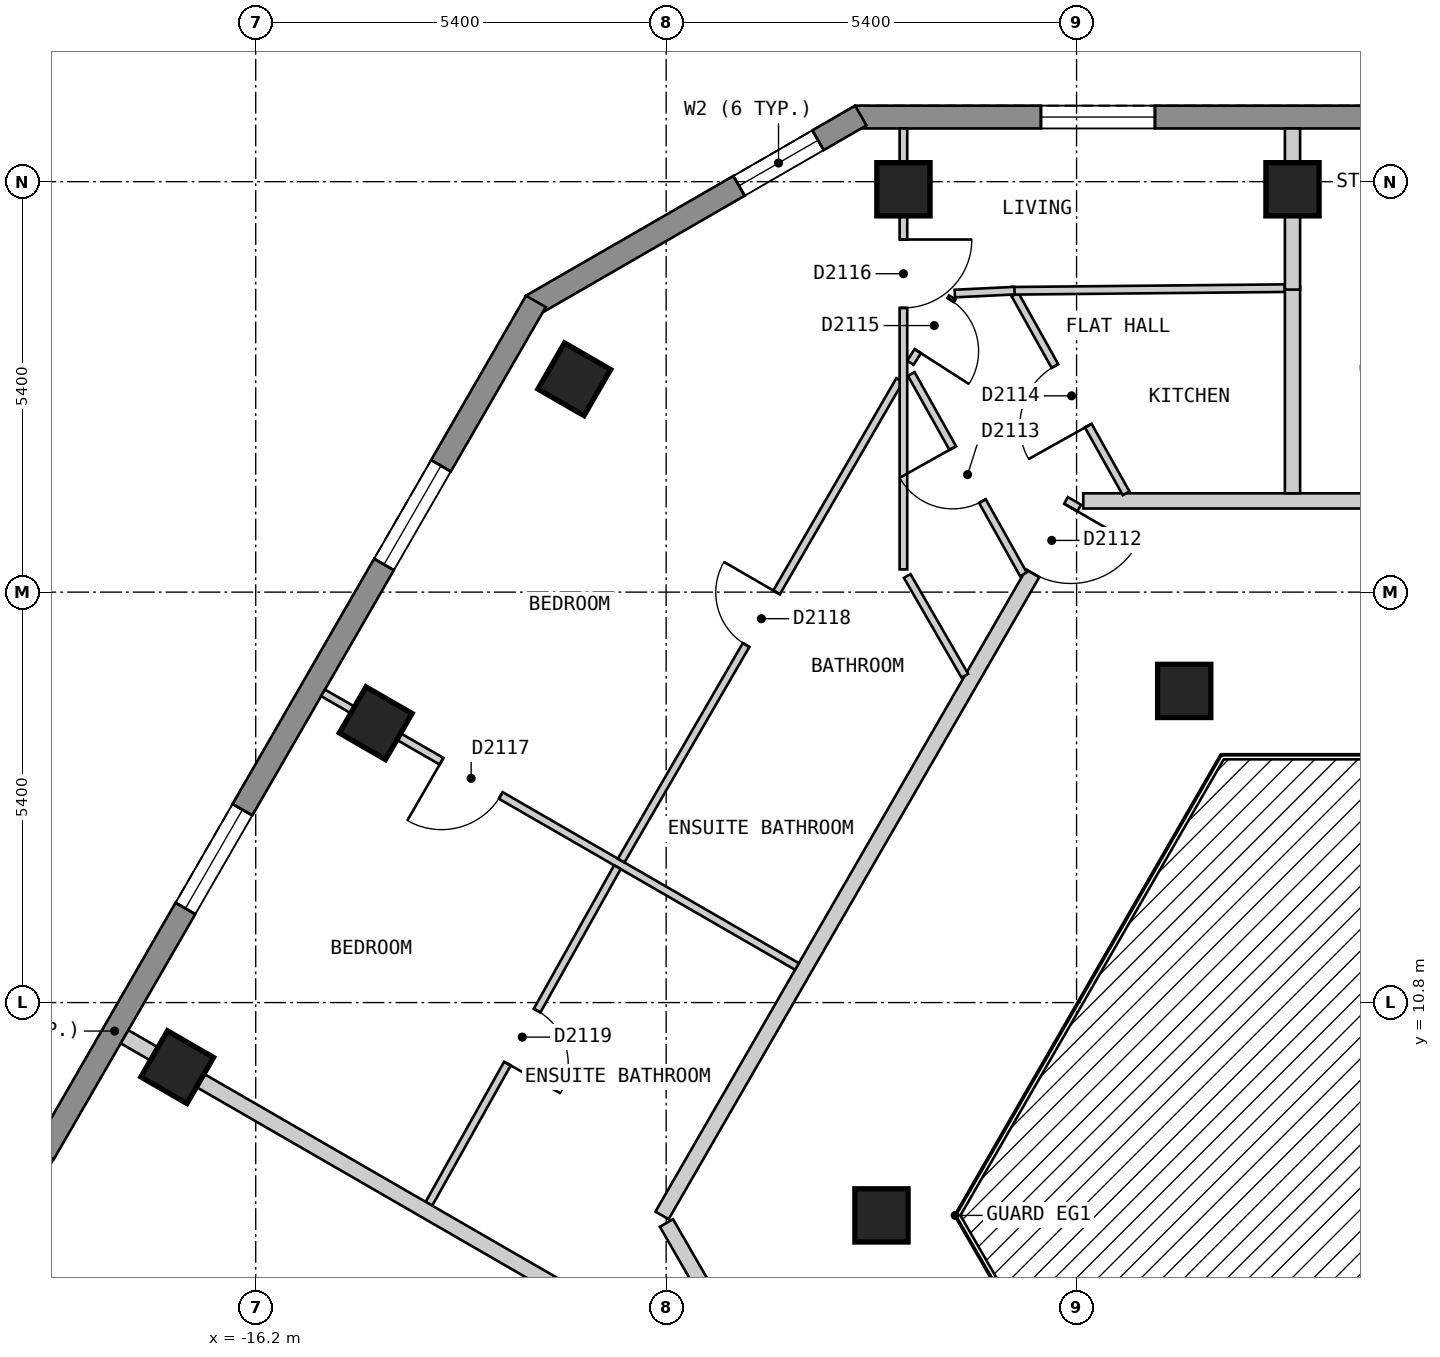
"""IFC4 building model, lengths in metres.
Left out: names, types, materials, properties, quantities, classifications, styles, units other than length and angle.
Written with IfcOpenShell. Run it as: python <this file> out.ifc"""

import sys

from ifc_helpers import new_model, si_unit, direction, frame, frame_2d, origin, origin_2d, place, context, subcontext, project, spatial, polyline, rectangle, outline, extrude, element, fill, save


model = new_model("IFC4")
c1 = context("Model", 3, precision=1e-05, world=origin(), true_north=direction((0.0, 1.0)))
c2 = subcontext(c1, "Body", "Model", "MODEL_VIEW")
j1 = project(units=[si_unit("LENGTHUNIT", "METRE"), si_unit("PLANEANGLEUNIT", "RADIAN")], contexts=[c1])
p1 = place(None, origin())
s1 = spatial("IfcSite", under=j1, at=p1, CompositionType="ELEMENT")
p2 = place(p1, origin())
s2 = spatial("IfcBuilding", under=s1, at=p2, CompositionType="ELEMENT")
p3 = place(p2, frame((0.0, 0.0, 205.8)))
s3 = spatial("IfcBuildingStorey", under=s2, at=p3, CompositionType="ELEMENT", Elevation=205.8)
for number, where, z_axis, x_axis in (
    (1, (-2.559, 21.5, 0.0), (0.0, 0.0, 1.0), (-1.0, 0.0, 0.0)),
    (2, (-7.678, 21.5, 0.0), (0.0, 0.0, 1.0), (-1.0, 0.0, 0.0)),
    (3, (-12.009, 19.0, 0.0), (0.0, 0.0, 1.0), (-0.5, -0.866, 0.0)),
    (4, (-14.621, 14.475, 0.0), (0.0, 0.0, 1.0), (-0.5, -0.866, 0.0)),
    (5, (-17.233, 9.95, 0.0), (0.0, 0.0, 1.0), (-0.5, -0.866, 0.0)),
    (6, (-3.984, 14.9, 0.0), (0.0, 0.0, 1.0), (1.0, 0.0, 0.0)),
    (7, (-7.967, 8.0, 0.0), (0.0, 0.0, 1.0), (1.0, 0.0, 0.0)),
):
    element("IfcColumn", number, at=place(p3, frame(where, z_axis=z_axis, x_axis=x_axis)), inside=s3, PredefinedType="COLUMN", context=c2, shape_type="SweptSolid", body=[
        extrude(rectangle(XDim=0.7, YDim=0.7, at=origin_2d()), origin(), (0.0, 0.0, 1.0), 3.0),
    ])
p4 = place(p3, frame((8.314, 22.45, 0.0), z_axis=(0.0, 0.0, 1.0), x_axis=(-1.0, 0.0, 0.0)))
e8 = element("IfcWall", 8, at=p4, inside=s3, PredefinedType="SOLIDWALL", context=c2, shape_type="SweptSolid", body=[
    extrude(outline(polyline([(0.0, -0.15), (16.628, -0.15), (16.548, 0.15), (0.08, 0.15), (0.0, -0.15)])), origin(), (0.0, 0.0, 1.0), 2.7),
])
p5 = place(p4, frame((2.444, 0.0, 0.15)))
e9 = element("IfcOpeningElement", 9, at=p5, cuts=e8, PredefinedType="OPENING", context=c2, shape_type="SweptSolid", body=[
    extrude(rectangle(XDim=1.5, YDim=2.1, at=frame_2d((0.75, 1.05))), frame((0.0, 0.16, 0.0), z_axis=(0.0, -1.0, 0.0), x_axis=(1.0, 0.0, 0.0)), (0.0, 0.0, 1.0), 0.32),
])
p6 = place(p4, frame((7.564, 0.0, 0.15)))
e10 = element("IfcOpeningElement", 10, at=p6, cuts=e8, PredefinedType="OPENING", context=c2, shape_type="SweptSolid", body=[
    extrude(rectangle(XDim=1.5, YDim=2.1, at=frame_2d((0.75, 1.05))), frame((0.0, 0.16, 0.0), z_axis=(0.0, -1.0, 0.0), x_axis=(1.0, 0.0, 0.0)), (0.0, 0.0, 1.0), 0.32),
])
p7 = place(p4, frame((12.683, 0.0, 0.15)))
e11 = element("IfcOpeningElement", 11, at=p7, cuts=e8, PredefinedType="OPENING", context=c2, shape_type="SweptSolid", body=[
    extrude(rectangle(XDim=1.5, YDim=2.1, at=frame_2d((0.75, 1.05))), frame((0.0, 0.16, 0.0), z_axis=(0.0, -1.0, 0.0), x_axis=(1.0, 0.0, 0.0)), (0.0, 0.0, 1.0), 0.32),
])
p8 = place(p3, frame((-8.239, 22.47, 0.0), z_axis=(0.0, 0.0, 1.0), x_axis=(-0.866022959057, -0.500004234368, 0.0)))
e12 = element("IfcWall", 12, at=p8, inside=s3, PredefinedType="SOLIDWALL", context=c2, shape_type="SweptSolid", body=[
    extrude(outline(polyline([(0.0, -0.15), (5.0, -0.15), (4.92, 0.15), (0.08, 0.15), (0.0, -0.15)])), origin(), (0.0, 0.0, 1.0), 2.7),
])
p9 = place(p8, frame((0.65, 0.0, 0.15)))
e13 = element("IfcOpeningElement", 13, at=p9, cuts=e12, PredefinedType="OPENING", context=c2, shape_type="SweptSolid", body=[
    extrude(rectangle(XDim=1.2, YDim=2.1, at=frame_2d((0.6, 1.05))), frame((0.0, 0.16, 0.0), z_axis=(0.0, -1.0, 0.0), x_axis=(1.0, 0.0, 0.0)), (0.0, 0.0, 1.0), 0.32),
])
p10 = place(p3, frame((-12.514, 20.025, 0.0), z_axis=(0.0, 0.0, 1.0), x_axis=(-0.500003656944, -0.866023292436, 0.0)))
e14 = element("IfcWall", 14, at=p10, inside=s3, PredefinedType="SOLIDWALL", context=c2, shape_type="SweptSolid", body=[
    extrude(outline(polyline([(0.0, -0.15), (22.17, -0.15), (22.09, 0.15), (0.08, 0.15), (0.0, -0.15)])), origin(), (0.0, 0.0, 1.0), 2.7),
])
p11 = place(p10, frame((2.497, 0.0, 0.15)))
e15 = element("IfcOpeningElement", 15, at=p11, cuts=e14, PredefinedType="OPENING", context=c2, shape_type="SweptSolid", body=[
    extrude(rectangle(XDim=1.5, YDim=2.1, at=frame_2d((0.75, 1.05))), frame((0.0, 0.16, 0.0), z_axis=(0.0, -1.0, 0.0), x_axis=(1.0, 0.0, 0.0)), (0.0, 0.0, 1.0), 0.32),
])
p12 = place(p10, frame((7.722, 0.0, 0.15)))
e16 = element("IfcOpeningElement", 16, at=p12, cuts=e14, PredefinedType="OPENING", context=c2, shape_type="SweptSolid", body=[
    extrude(rectangle(XDim=1.5, YDim=2.1, at=frame_2d((0.75, 1.05))), frame((0.0, 0.16, 0.0), z_axis=(0.0, -1.0, 0.0), x_axis=(1.0, 0.0, 0.0)), (0.0, 0.0, 1.0), 0.32),
])
p13 = place(p10, frame((12.948, 0.0, 0.15)))
e17 = element("IfcOpeningElement", 17, at=p13, cuts=e14, PredefinedType="OPENING", context=c2, shape_type="SweptSolid", body=[
    extrude(rectangle(XDim=1.5, YDim=2.1, at=frame_2d((0.75, 1.05))), frame((0.0, 0.16, 0.0), z_axis=(0.0, -1.0, 0.0), x_axis=(1.0, 0.0, 0.0)), (0.0, 0.0, 1.0), 0.32),
])
p14 = place(p10, frame((18.173, 0.0, 0.15)))
e18 = element("IfcOpeningElement", 18, at=p14, cuts=e14, PredefinedType="OPENING", context=c2, shape_type="SweptSolid", body=[
    extrude(rectangle(XDim=1.5, YDim=2.1, at=frame_2d((0.75, 1.05))), frame((0.0, 0.16, 0.0), z_axis=(0.0, -1.0, 0.0), x_axis=(1.0, 0.0, 0.0)), (0.0, 0.0, 1.0), 0.32),
])
p15 = place(p3, frame((-10.796, 7.9, 0.0), z_axis=(0.0, 0.0, 1.0), x_axis=(0.499698840221, -0.866199208659, 0.0)))
e19 = element("IfcWall", 19, at=p15, inside=s3, PredefinedType="PARTITIONING", context=c2, shape_type="SweptSolid", body=[
    extrude(rectangle(XDim=2.685, YDim=0.2, at=frame_2d((1.343, 0.0))), origin(), (0.0, 0.0, 1.0), 2.7),
])
p16 = place(p3, frame((-5.312, 17.4, 0.0), z_axis=(0.0, 0.0, 1.0), x_axis=(1.0, 0.0, 0.0)))
e20 = element("IfcWall", 20, at=p16, inside=s3, PredefinedType="PARTITIONING", context=c2, shape_type="SweptSolid", body=[
    extrude(rectangle(XDim=10.739, YDim=0.2, at=frame_2d((5.37, 0.0))), origin(), (0.0, 0.0, 1.0), 2.7),
])
p17 = place(p16, frame((9.534, 0.0, 0.0)))
e21 = element("IfcOpeningElement", 21, at=p17, cuts=e20, PredefinedType="OPENING", context=c2, shape_type="SweptSolid", body=[
    extrude(rectangle(XDim=1.0, YDim=2.1, at=frame_2d((0.5, 1.05))), frame((0.0, 0.11, 0.0), z_axis=(0.0, -1.0, 0.0), x_axis=(1.0, 0.0, 0.0)), (0.0, 0.0, 1.0), 0.22),
])
p18 = place(p16, frame((4.812, 0.0, 0.0)))
e22 = element("IfcOpeningElement", 22, at=p18, cuts=e20, PredefinedType="OPENING", context=c2, shape_type="SweptSolid", body=[
    extrude(rectangle(XDim=1.0, YDim=2.1, at=frame_2d((0.5, 1.05))), frame((0.0, 0.11, 0.0), z_axis=(0.0, -1.0, 0.0), x_axis=(1.0, 0.0, 0.0)), (0.0, 0.0, 1.0), 0.22),
])
p19 = place(p3, frame((-10.854, 8.0, 0.0), z_axis=(0.0, 0.0, 1.0), x_axis=(0.499997637144, 0.866026767976, 0.0)))
e23 = element("IfcWall", 23, at=p19, inside=s3, PredefinedType="PARTITIONING", context=c2, shape_type="SweptSolid", body=[
    extrude(rectangle(XDim=10.854, YDim=0.2, at=frame_2d((5.427, 0.0))), origin(), (0.0, 0.0, 1.0), 2.7),
])
p20 = place(p19, frame((9.754, 0.0, 0.0)))
e24 = element("IfcOpeningElement", 24, at=p20, cuts=e23, PredefinedType="OPENING", context=c2, shape_type="SweptSolid", body=[
    extrude(rectangle(XDim=1.0, YDim=2.1, at=frame_2d((0.5, 1.05))), frame((0.0, 0.11, 0.0), z_axis=(0.0, -1.0, 0.0), x_axis=(1.0, 0.0, 0.0)), (0.0, 0.0, 1.0), 0.22),
])
p21 = place(p3, frame((-7.628, 16.412, 0.0), z_axis=(0.0, 0.0, 1.0), x_axis=(0.500159472144, -0.86593331292, 0.0)))
e25 = element("IfcWall", 25, at=p21, inside=s3, PredefinedType="PARTITIONING", context=c2, shape_type="SweptSolid", body=[
    extrude(rectangle(XDim=1.515, YDim=0.1, at=frame_2d((0.758, 0.0))), origin(), (0.0, 0.0, 1.0), 2.7),
])
p22 = place(p3, frame((-6.211, 20.115, 0.0), z_axis=(0.0, 0.0, 1.0), x_axis=(0.488221234931, -0.872719901092, 0.0)))
e26 = element("IfcWall", 26, at=p22, inside=s3, PredefinedType="PARTITIONING", context=c2, shape_type="SweptSolid", body=[
    extrude(rectangle(XDim=2.996, YDim=0.1, at=frame_2d((1.498, 0.0))), origin(), (0.0, 0.0, 1.0), 2.7),
])
p23 = place(p22, frame((1.077, 0.0, 0.0)))
e27 = element("IfcOpeningElement", 27, at=p23, cuts=e26, PredefinedType="OPENING", context=c2, shape_type="SweptSolid", body=[
    extrude(rectangle(XDim=0.9, YDim=2.1, at=frame_2d((0.45, 1.05))), frame((0.0, 0.06, 0.0), z_axis=(0.0, -1.0, 0.0), x_axis=(1.0, 0.0, 0.0)), (0.0, 0.0, 1.0), 0.12),
])
p24 = place(p3, frame((-7.575, 19.07, 0.0), z_axis=(0.0, 0.0, 1.0), x_axis=(0.488413788688, -0.872612153834, 0.0)))
e28 = element("IfcWall", 28, at=p24, inside=s3, PredefinedType="PARTITIONING", context=c2, shape_type="SweptSolid", body=[
    extrude(rectangle(XDim=3.02, YDim=0.1, at=frame_2d((1.51, 0.0))), origin(), (0.0, 0.0, 1.0), 2.7),
])
p25 = place(p24, frame((1.117, 0.0, 0.0)))
e29 = element("IfcOpeningElement", 29, at=p25, cuts=e28, PredefinedType="OPENING", context=c2, shape_type="SweptSolid", body=[
    extrude(rectangle(XDim=0.8, YDim=2.1, at=frame_2d((0.4, 1.05))), frame((0.0, 0.06, 0.0), z_axis=(0.0, -1.0, 0.0), x_axis=(1.0, 0.0, 0.0)), (0.0, 0.0, 1.0), 0.12),
])
p26 = place(p3, frame((-15.314, 14.875, 0.0), z_axis=(0.0, 0.0, 1.0), x_axis=(0.866001485781, -0.500041424909, 0.0)))
e30 = element("IfcWall", 30, at=p26, inside=s3, PredefinedType="PARTITIONING", context=c2, shape_type="SweptSolid", body=[
    extrude(rectangle(XDim=7.2, YDim=0.1, at=frame_2d((3.6, 0.0))), origin(), (0.0, 0.0, 1.0), 2.7),
])
p27 = place(p26, frame((1.8, 0.0, 0.0)))
e31 = element("IfcOpeningElement", 31, at=p27, cuts=e30, PredefinedType="OPENING", context=c2, shape_type="SweptSolid", body=[
    extrude(rectangle(XDim=0.9, YDim=2.1, at=frame_2d((0.45, 1.05))), frame((0.0, 0.06, 0.0), z_axis=(0.0, -1.0, 0.0), x_axis=(1.0, 0.0, 0.0)), (0.0, 0.0, 1.0), 0.12),
])
p28 = place(p3, frame((-6.259, 20.164, 0.0), z_axis=(0.0, 0.0, 1.0), x_axis=(0.999952982126, 0.009697089139, 0.0)))
e32 = element("IfcWall", 32, at=p28, inside=s3, PredefinedType="PARTITIONING", context=c2, shape_type="SweptSolid", body=[
    extrude(rectangle(XDim=3.6, YDim=0.1, at=frame_2d((1.8, 0.0))), origin(), (0.0, 0.0, 1.0), 2.7),
])
p29 = place(p3, frame((-7.587, 19.218, 0.0), z_axis=(0.0, 0.0, 1.0), x_axis=(0.54066090195, 0.841240624972, 0.0)))
e33 = element("IfcWall", 33, at=p29, inside=s3, PredefinedType="PARTITIONING", context=c2, shape_type="SweptSolid", body=[
    extrude(rectangle(XDim=1.021, YDim=0.1, at=frame_2d((0.51, 0.0))), origin(), (0.0, 0.0, 1.0), 2.7),
])
p30 = place(p29, frame((0.181, 0.0, 0.0)))
e34 = element("IfcOpeningElement", 34, at=p30, cuts=e33, PredefinedType="OPENING", context=c2, shape_type="SweptSolid", body=[
    extrude(rectangle(XDim=0.8, YDim=2.1, at=frame_2d((0.4, 1.05))), frame((0.0, 0.06, 0.0), z_axis=(0.0, -1.0, 0.0), x_axis=(1.0, 0.0, 0.0)), (0.0, 0.0, 1.0), 0.12),
])
p31 = place(p3, frame((-11.392, 12.668, 0.0), z_axis=(0.0, 0.0, 1.0), x_axis=(0.501440551074, 0.865192102217, 0.0)))
e35 = element("IfcWall", 35, at=p31, inside=s3, PredefinedType="PARTITIONING", context=c2, shape_type="SweptSolid", body=[
    extrude(rectangle(XDim=7.307, YDim=0.1, at=frame_2d((3.654, 0.0))), origin(), (0.0, 0.0, 1.0), 2.7),
])
p32 = place(p31, frame((3.278, 0.0, 0.0)))
e36 = element("IfcOpeningElement", 36, at=p32, cuts=e35, PredefinedType="OPENING", context=c2, shape_type="SweptSolid", body=[
    extrude(rectangle(XDim=0.8, YDim=2.1, at=frame_2d((0.4, 1.05))), frame((0.0, 0.06, 0.0), z_axis=(0.0, -1.0, 0.0), x_axis=(1.0, 0.0, 0.0)), (0.0, 0.0, 1.0), 0.12),
])
p33 = place(p3, frame((-13.921, 8.153, 0.0), z_axis=(0.0, 0.0, 1.0), x_axis=(0.488568218554, 0.872525699231, 0.0)))
e37 = element("IfcWall", 37, at=p33, inside=s3, PredefinedType="PARTITIONING", context=c2, shape_type="SweptSolid", body=[
    extrude(rectangle(XDim=5.076, YDim=0.1, at=frame_2d((2.538, 0.0))), origin(), (0.0, 0.0, 1.0), 2.7),
])
p34 = place(p33, frame((2.113, 0.0, 0.0)))
e38 = element("IfcOpeningElement", 38, at=p34, cuts=e37, PredefinedType="OPENING", context=c2, shape_type="SweptSolid", body=[
    extrude(rectangle(XDim=0.8, YDim=2.1, at=frame_2d((0.4, 1.05))), frame((0.0, 0.06, 0.0), z_axis=(0.0, -1.0, 0.0), x_axis=(1.0, 0.0, 0.0)), (0.0, 0.0, 1.0), 0.12),
])
p35 = place(p3, frame((-7.678, 16.499, 0.0), z_axis=(0.0, 0.0, 1.0), x_axis=(0.0, 1.0, 0.0)))
e39 = element("IfcWall", 39, at=p35, inside=s3, PredefinedType="PARTITIONING", context=c2, shape_type="SweptSolid", body=[
    extrude(rectangle(XDim=5.801, YDim=0.1, at=frame_2d((2.9, 0.0))), origin(), (0.0, 0.0, 1.0), 2.7),
])
p36 = place(p35, frame((3.44, 0.0, 0.0)))
e40 = element("IfcOpeningElement", 40, at=p36, cuts=e39, PredefinedType="OPENING", context=c2, shape_type="SweptSolid", body=[
    extrude(rectangle(XDim=0.9, YDim=2.1, at=frame_2d((0.45, 1.05))), frame((0.0, 0.06, 0.0), z_axis=(0.0, -1.0, 0.0), x_axis=(1.0, 0.0, 0.0)), (0.0, 0.0, 1.0), 0.12),
])
p37 = place(p3, frame((-7.002, 20.128, 0.0), z_axis=(0.0, 0.0, 1.0), x_axis=(0.998824855741, 0.048465529548, 0.0)))
e41 = element("IfcWall", 41, at=p37, inside=s3, PredefinedType="PARTITIONING", context=c2, shape_type="SweptSolid", body=[
    extrude(rectangle(XDim=0.786, YDim=0.1, at=frame_2d((0.393, 0.0))), origin(), (0.0, 0.0, 1.0), 2.7),
])
p38 = place(p3, frame((-2.559, 20.22, 0.0), z_axis=(0.0, 0.0, 1.0), x_axis=(0.0, -1.0, 0.0)))
e42 = element("IfcWall", 42, at=p38, inside=s3, PredefinedType="PARTITIONING", context=c2, shape_type="SweptSolid", body=[
    extrude(rectangle(XDim=2.72, YDim=0.2, at=frame_2d((1.36, 0.0))), origin(), (0.0, 0.0, 1.0), 2.7),
])
p39 = place(p3, frame((-17.926, 10.35, 0.0), z_axis=(0.0, 0.0, 1.0), x_axis=(0.866018411306, -0.500012111133, 0.0)))
e43 = element("IfcWall", 43, at=p39, inside=s3, PredefinedType="PARTITIONING", context=c2, shape_type="SweptSolid", body=[
    extrude(rectangle(XDim=9.898, YDim=0.2, at=frame_2d((4.949, 0.0))), origin(), (0.0, 0.0, 1.0), 2.7),
])
p40 = place(p3, frame((-2.559, 20.18, 0.0), z_axis=(0.0, 0.0, 1.0), x_axis=(0.0, 1.0, 0.0)))
e44 = element("IfcWall", 44, at=p40, inside=s3, PredefinedType="PARTITIONING", context=c2, shape_type="SweptSolid", body=[
    extrude(rectangle(XDim=2.12, YDim=0.2, at=frame_2d((1.06, 0.0))), origin(), (0.0, 0.0, 1.0), 2.7),
])
p41 = place(p7, origin())
e45 = element("IfcWindow", 45, at=p41, inside=s3, PartitioningType="SINGLE_PANEL", PredefinedType="WINDOW", context=c2, shape_type="SweptSolid", body=[
    extrude(rectangle(XDim=1.5, YDim=2.1, at=frame_2d((0.75, 1.05))), frame((0.0, 0.03, 0.0), z_axis=(0.0, -1.0, 0.0), x_axis=(1.0, 0.0, 0.0)), (0.0, 0.0, 1.0), 0.06),
])
fill(e11, e45)
p42 = place(p9, origin())
e46 = element("IfcWindow", 46, at=p42, inside=s3, PartitioningType="SINGLE_PANEL", PredefinedType="WINDOW", context=c2, shape_type="SweptSolid", body=[
    extrude(rectangle(XDim=1.2, YDim=2.1, at=frame_2d((0.6, 1.05))), frame((0.0, 0.03, 0.0), z_axis=(0.0, -1.0, 0.0), x_axis=(1.0, 0.0, 0.0)), (0.0, 0.0, 1.0), 0.06),
])
fill(e13, e46)
p43 = place(p11, origin())
e47 = element("IfcWindow", 47, at=p43, inside=s3, PartitioningType="SINGLE_PANEL", PredefinedType="WINDOW", context=c2, shape_type="SweptSolid", body=[
    extrude(rectangle(XDim=1.5, YDim=2.1, at=frame_2d((0.75, 1.05))), frame((0.0, 0.03, 0.0), z_axis=(0.0, -1.0, 0.0), x_axis=(1.0, 0.0, 0.0)), (0.0, 0.0, 1.0), 0.06),
])
fill(e15, e47)
p44 = place(p12, origin())
e48 = element("IfcWindow", 48, at=p44, inside=s3, PartitioningType="SINGLE_PANEL", PredefinedType="WINDOW", context=c2, shape_type="SweptSolid", body=[
    extrude(rectangle(XDim=1.5, YDim=2.1, at=frame_2d((0.75, 1.05))), frame((0.0, 0.03, 0.0), z_axis=(0.0, -1.0, 0.0), x_axis=(1.0, 0.0, 0.0)), (0.0, 0.0, 1.0), 0.06),
])
fill(e16, e48)
p45 = place(p20, origin())
e49 = element("IfcDoor", 49, at=p45, inside=s3, OperationType="SINGLE_SWING_RIGHT", PredefinedType="DOOR", context=c2, shape_type="SweptSolid", body=[
    extrude(rectangle(XDim=1.0, YDim=2.1, at=frame_2d((0.5, 1.05))), frame((0.0, 0.025, 0.0), z_axis=(0.0, -1.0, 0.0), x_axis=(1.0, 0.0, 0.0)), (0.0, 0.0, 1.0), 0.05),
])
fill(e24, e49)
p46 = place(p25, origin())
e50 = element("IfcDoor", 50, at=p46, inside=s3, OperationType="SINGLE_SWING_LEFT", PredefinedType="DOOR", context=c2, shape_type="SweptSolid", body=[
    extrude(rectangle(XDim=0.8, YDim=2.1, at=frame_2d((0.4, 1.05))), frame((0.0, 0.025, 0.0), z_axis=(0.0, -1.0, 0.0), x_axis=(1.0, 0.0, 0.0)), (0.0, 0.0, 1.0), 0.05),
])
fill(e29, e50)
p47 = place(p23, origin())
e51 = element("IfcDoor", 51, at=p47, inside=s3, OperationType="SINGLE_SWING_RIGHT", PredefinedType="DOOR", context=c2, shape_type="SweptSolid", body=[
    extrude(rectangle(XDim=0.9, YDim=2.1, at=frame_2d((0.45, 1.05))), frame((0.0, 0.025, 0.0), z_axis=(0.0, -1.0, 0.0), x_axis=(1.0, 0.0, 0.0)), (0.0, 0.0, 1.0), 0.05),
])
fill(e27, e51)
p48 = place(p30, origin())
e52 = element("IfcDoor", 52, at=p48, inside=s3, OperationType="SINGLE_SWING_LEFT", PredefinedType="DOOR", context=c2, shape_type="SweptSolid", body=[
    extrude(rectangle(XDim=0.8, YDim=2.1, at=frame_2d((0.4, 1.05))), frame((0.0, 0.025, 0.0), z_axis=(0.0, -1.0, 0.0), x_axis=(1.0, 0.0, 0.0)), (0.0, 0.0, 1.0), 0.05),
])
fill(e34, e52)
p49 = place(p36, origin())
e53 = element("IfcDoor", 53, at=p49, inside=s3, OperationType="SINGLE_SWING_RIGHT", PredefinedType="DOOR", context=c2, shape_type="SweptSolid", body=[
    extrude(rectangle(XDim=0.9, YDim=2.1, at=frame_2d((0.45, 1.05))), frame((0.0, 0.025, 0.0), z_axis=(0.0, -1.0, 0.0), x_axis=(1.0, 0.0, 0.0)), (0.0, 0.0, 1.0), 0.05),
])
fill(e40, e53)
p50 = place(p27, origin())
e54 = element("IfcDoor", 54, at=p50, inside=s3, OperationType="SINGLE_SWING_LEFT", PredefinedType="DOOR", context=c2, shape_type="SweptSolid", body=[
    extrude(rectangle(XDim=0.9, YDim=2.1, at=frame_2d((0.45, 1.05))), frame((0.0, 0.025, 0.0), z_axis=(0.0, -1.0, 0.0), x_axis=(1.0, 0.0, 0.0)), (0.0, 0.0, 1.0), 0.05),
])
fill(e31, e54)
p51 = place(p32, origin())
e55 = element("IfcDoor", 55, at=p51, inside=s3, OperationType="SINGLE_SWING_RIGHT", PredefinedType="DOOR", context=c2, shape_type="SweptSolid", body=[
    extrude(rectangle(XDim=0.8, YDim=2.1, at=frame_2d((0.4, 1.05))), frame((0.0, 0.025, 0.0), z_axis=(0.0, -1.0, 0.0), x_axis=(1.0, 0.0, 0.0)), (0.0, 0.0, 1.0), 0.05),
])
fill(e36, e55)
p52 = place(p34, origin())
e56 = element("IfcDoor", 56, at=p52, inside=s3, OperationType="SINGLE_SWING_LEFT", PredefinedType="DOOR", context=c2, shape_type="SweptSolid", body=[
    extrude(rectangle(XDim=0.8, YDim=2.1, at=frame_2d((0.4, 1.05))), frame((0.0, 0.025, 0.0), z_axis=(0.0, -1.0, 0.0), x_axis=(1.0, 0.0, 0.0)), (0.0, 0.0, 1.0), 0.05),
])
fill(e38, e56)
save(model, sys.argv[1])
